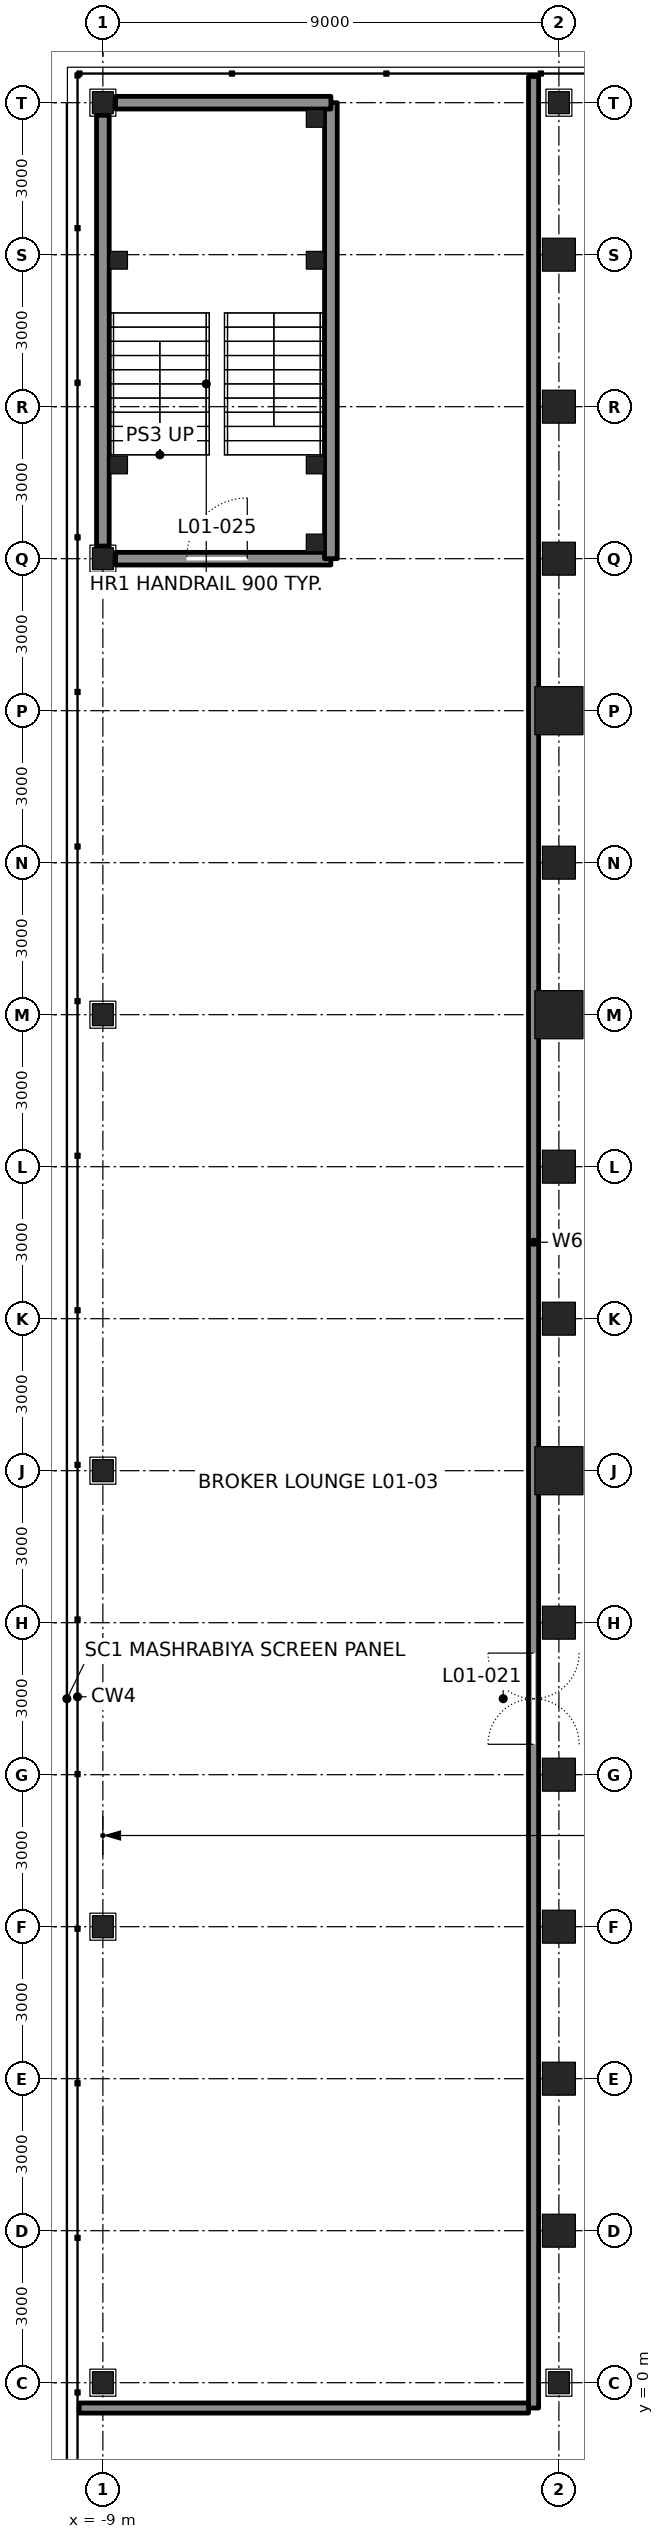
"""IFC4 building model, lengths in metres.
Left out: names, types, materials, properties, quantities, classifications, styles, units other than length and angle.
Written with IfcOpenShell. Run it as: python <this file> out.ifc"""

import sys

from ifc_helpers import new_model, si_unit, direction, frame, frame_2d, origin, origin_2d, place, context, subcontext, project, spatial, rectangle, hollow_rectangle, i_section, extrude, element, fill, save


model = new_model("IFC4")
c1 = context("Model", 3, precision=1e-05, world=origin(), true_north=direction((0.0, 1.0)))
c2 = subcontext(c1, "Body", "Model", "MODEL_VIEW")
j1 = project(units=[si_unit("LENGTHUNIT", "METRE"), si_unit("PLANEANGLEUNIT", "RADIAN")], contexts=[c1])
p1 = place(None, origin())
s1 = spatial("IfcSite", under=j1, at=p1, CompositionType="ELEMENT")
p2 = place(p1, origin())
s2 = spatial("IfcBuilding", under=s1, at=p2, CompositionType="ELEMENT")
p3 = place(p2, frame((0.0, 0.0, 6.0)))
s3 = spatial("IfcBuildingStorey", under=s2, at=p3, CompositionType="ELEMENT", Elevation=6.0)
for number, where, z_axis, x_axis in (
    (1, (0.0, 42.0, 0.0), (0.0, 0.0, 1.0), (-1.0, 0.0, 0.0)),
    (2, (0.0, 39.0, 0.0), (0.0, 0.0, 1.0), (-1.0, 0.0, 0.0)),
    (3, (0.0, 36.0, 0.0), (0.0, 0.0, 1.0), (-1.0, 0.0, 0.0)),
):
    element("IfcColumn", number, at=place(p3, frame(where, z_axis=z_axis, x_axis=x_axis)), inside=s3, PredefinedType="COLUMN", context=c2, shape_type="SweptSolid", body=[
        extrude(hollow_rectangle(XDim=0.65, YDim=0.65, WallThickness=0.065, at=origin_2d()), origin(), (0.0, 0.0, 1.0), 7.5),
    ])
p4 = place(p3, frame((0.0, 33.0, 0.0), z_axis=(0.0, 0.0, 1.0), x_axis=(-1.0, 0.0, 0.0)))
e4 = element("IfcColumn", 4, at=p4, inside=s3, PredefinedType="COLUMN", context=c2, shape_type="SweptSolid", body=[
    extrude(hollow_rectangle(XDim=0.95, YDim=0.95, WallThickness=0.11, at=origin_2d()), origin(), (0.0, 0.0, 1.0), 7.5),
])
p5 = place(p3, frame((0.0, 30.0, 0.0), z_axis=(0.0, 0.0, 1.0), x_axis=(-1.0, 0.0, 0.0)))
e5 = element("IfcColumn", 5, at=p5, inside=s3, PredefinedType="COLUMN", context=c2, shape_type="SweptSolid", body=[
    extrude(hollow_rectangle(XDim=0.65, YDim=0.65, WallThickness=0.065, at=origin_2d()), origin(), (0.0, 0.0, 1.0), 7.5),
])
p6 = place(p3, frame((0.0, 27.0, 0.0), z_axis=(0.0, 0.0, 1.0), x_axis=(-1.0, 0.0, 0.0)))
e6 = element("IfcColumn", 6, at=p6, inside=s3, PredefinedType="COLUMN", context=c2, shape_type="SweptSolid", body=[
    extrude(hollow_rectangle(XDim=0.95, YDim=0.95, WallThickness=0.11, at=origin_2d()), origin(), (0.0, 0.0, 1.0), 7.5),
])
for number, where, z_axis, x_axis in (
    (7, (0.0, 24.0, 0.0), (0.0, 0.0, 1.0), (-1.0, 0.0, 0.0)),
    (8, (0.0, 21.0, 0.0), (0.0, 0.0, 1.0), (-1.0, 0.0, 0.0)),
):
    element("IfcColumn", number, at=place(p3, frame(where, z_axis=z_axis, x_axis=x_axis)), inside=s3, PredefinedType="COLUMN", context=c2, shape_type="SweptSolid", body=[
        extrude(hollow_rectangle(XDim=0.65, YDim=0.65, WallThickness=0.065, at=origin_2d()), origin(), (0.0, 0.0, 1.0), 7.5),
    ])
p7 = place(p3, frame((0.0, 18.0, 0.0), z_axis=(0.0, 0.0, 1.0), x_axis=(-1.0, 0.0, 0.0)))
e9 = element("IfcColumn", 9, at=p7, inside=s3, PredefinedType="COLUMN", context=c2, shape_type="SweptSolid", body=[
    extrude(hollow_rectangle(XDim=0.95, YDim=0.95, WallThickness=0.11, at=origin_2d()), origin(), (0.0, 0.0, 1.0), 7.5),
])
for number, where, z_axis, x_axis in (
    (10, (0.0, 15.0, 0.0), (0.0, 0.0, 1.0), (-1.0, 0.0, 0.0)),
    (11, (0.0, 12.0, 0.0), (0.0, 0.0, 1.0), (-1.0, 0.0, 0.0)),
    (12, (0.0, 9.0, 0.0), (0.0, 0.0, 1.0), (-1.0, 0.0, 0.0)),
    (13, (0.0, 6.0, 0.0), (0.0, 0.0, 1.0), (-1.0, 0.0, 0.0)),
    (14, (0.0, 3.0, 0.0), (0.0, 0.0, 1.0), (-1.0, 0.0, 0.0)),
):
    element("IfcColumn", number, at=place(p3, frame(where, z_axis=z_axis, x_axis=x_axis)), inside=s3, PredefinedType="COLUMN", context=c2, shape_type="SweptSolid", body=[
        extrude(hollow_rectangle(XDim=0.65, YDim=0.65, WallThickness=0.065, at=origin_2d()), origin(), (0.0, 0.0, 1.0), 7.5),
    ])
for number, where, z_axis, x_axis in (
    (15, (-9.0, 0.0, 0.0), (0.0, 0.0, 1.0), (1.0, 0.0, 0.0)),
    (16, (-9.0, 9.0, 0.0), (0.0, 0.0, 1.0), (1.0, 0.0, 0.0)),
    (17, (-9.0, 18.0, 0.0), (0.0, 0.0, 1.0), (1.0, 0.0, 0.0)),
    (18, (-9.0, 27.0, 0.0), (0.0, 0.0, 1.0), (1.0, 0.0, 0.0)),
    (19, (-9.0, 36.0, 0.0), (0.0, 0.0, 1.0), (1.0, 0.0, 0.0)),
    (20, (-9.0, 45.0, 0.0), (0.0, 0.0, 1.0), (1.0, 0.0, 0.0)),
    (21, (0.0, 0.0, 0.0), (0.0, 0.0, 1.0), (1.0, 0.0, 0.0)),
    (22, (0.0, 45.0, 0.0), (0.0, 0.0, 1.0), (1.0, 0.0, 0.0)),
):
    element("IfcColumn", number, at=place(p3, frame(where, z_axis=z_axis, x_axis=x_axis)), inside=s3, PredefinedType="COLUMN", context=c2, shape_type="SweptSolid", body=[
        extrude(i_section(OverallWidth=0.411, OverallDepth=0.434, WebThickness=0.036, FlangeThickness=0.057, at=origin_2d()), origin(), (0.0, 0.0, 1.0), 7.5),
    ])
p8 = place(p3, frame((-0.5, -0.5, 0.0), z_axis=(0.0, 0.0, 1.0), x_axis=(0.0, 1.0, 0.0)))
e23 = element("IfcWall", 23, at=p8, inside=s3, PredefinedType="PARTITIONING", context=c2, shape_type="SweptSolid", body=[
    extrude(rectangle(XDim=46.018, YDim=0.2, at=frame_2d((23.009, 0.0))), origin(), (0.0, 0.0, 1.0), 7.3),
])
p9 = place(p8, frame((13.1, 0.0, 0.0)))
e24 = element("IfcOpeningElement", 24, at=p9, cuts=e23, PredefinedType="OPENING", context=c2, shape_type="SweptSolid", body=[
    extrude(rectangle(XDim=1.8, YDim=2.4, at=frame_2d((0.9, 1.2))), frame((0.0, 0.11, 0.0), z_axis=(0.0, -1.0, 0.0), x_axis=(1.0, 0.0, 0.0)), (0.0, 0.0, 1.0), 0.22),
])
p10 = place(p3, frame((-9.468, -0.5, 0.0), z_axis=(0.0, 0.0, 1.0), x_axis=(1.0, 0.0, 0.0)))
e25 = element("IfcWall", 25, at=p10, inside=s3, PredefinedType="PARTITIONING", context=c2, shape_type="SweptSolid", body=[
    extrude(rectangle(XDim=8.868, YDim=0.2, at=frame_2d((4.434, 0.0))), origin(), (0.0, 0.0, 1.0), 7.3),
])
p11 = place(p3, frame((-8.75, 36.0, 0.0), z_axis=(0.0, 0.0, 1.0), x_axis=(1.0, 0.0, 0.0)))
e26 = element("IfcWall", 26, at=p11, inside=s3, PredefinedType="SOLIDWALL", context=c2, shape_type="SweptSolid", body=[
    extrude(rectangle(XDim=4.25, YDim=0.25, at=frame_2d((2.125, 0.0))), origin(), (0.0, 0.0, 1.0), 6.353),
])
p12 = place(p11, frame((1.4, 0.0, 0.0)))
e27 = element("IfcOpeningElement", 27, at=p12, cuts=e26, PredefinedType="OPENING", context=c2, shape_type="SweptSolid", body=[
    extrude(rectangle(XDim=1.2, YDim=2.1, at=frame_2d((0.6, 1.05))), frame((0.0, 0.135, 0.0), z_axis=(0.0, -1.0, 0.0), x_axis=(1.0, 0.0, 0.0)), (0.0, 0.0, 1.0), 0.27),
])
p13 = place(p3, frame((-4.5, 36.0, 0.0), z_axis=(0.0, 0.0, 1.0), x_axis=(0.0, 1.0, 0.0)))
e28 = element("IfcWall", 28, at=p13, inside=s3, PredefinedType="SOLIDWALL", context=c2, shape_type="SweptSolid", body=[
    extrude(rectangle(XDim=9.0, YDim=0.25, at=frame_2d((4.5, 0.0))), origin(), (0.0, 0.0, 1.0), 6.353),
])
p14 = place(p3, frame((-8.75, 45.0, 0.0), z_axis=(0.0, 0.0, 1.0), x_axis=(1.0, 0.0, 0.0)))
e29 = element("IfcWall", 29, at=p14, inside=s3, PredefinedType="SOLIDWALL", context=c2, shape_type="SweptSolid", body=[
    extrude(rectangle(XDim=4.25, YDim=0.25, at=frame_2d((2.125, 0.0))), origin(), (0.0, 0.0, 1.0), 6.353),
])
p15 = place(p3, frame((-9.0, 36.25, 0.0), z_axis=(0.0, 0.0, 1.0), x_axis=(0.0, 1.0, 0.0)))
e30 = element("IfcWall", 30, at=p15, inside=s3, PredefinedType="SOLIDWALL", context=c2, shape_type="SweptSolid", body=[
    extrude(rectangle(XDim=8.5, YDim=0.25, at=frame_2d((4.25, 0.0))), origin(), (0.0, 0.0, 1.0), 6.353),
])
for number, where, z_axis, x_axis in (
    (31, (-4.81, 44.69, 0.0), (0.0, 0.0, 1.0), (1.0, 0.0, 0.0)),
    (32, (-8.69, 41.89, 0.0), (0.0, 0.0, 1.0), (1.0, 0.0, 0.0)),
    (33, (-4.81, 41.89, 0.0), (0.0, 0.0, 1.0), (1.0, 0.0, 0.0)),
    (34, (-8.69, 37.85, 0.0), (0.0, 0.0, 1.0), (1.0, 0.0, 0.0)),
    (35, (-4.81, 37.85, 0.0), (0.0, 0.0, 1.0), (1.0, 0.0, 0.0)),
    (36, (-4.81, 36.31, 0.0), (0.0, 0.0, 1.0), (1.0, 0.0, 0.0)),
):
    element("IfcColumn", number, at=place(p3, frame(where, z_axis=z_axis, x_axis=x_axis)), inside=s3, PredefinedType="COLUMN", context=c2, shape_type="SweptSolid", body=[
        extrude(hollow_rectangle(XDim=0.35, YDim=0.35, WallThickness=0.035, at=origin_2d()), origin(), (0.0, 0.0, 1.0), 7.5),
    ])
p16 = place(p9, origin())
e37 = element("IfcDoor", 37, at=p16, inside=s3, OperationType="DOUBLE_DOOR_DOUBLE_SWING", PredefinedType="DOOR", context=c2, shape_type="SweptSolid", body=[
    extrude(rectangle(XDim=1.8, YDim=2.4, at=frame_2d((0.9, 1.2))), frame((0.0, 0.025, 0.0), z_axis=(0.0, -1.0, 0.0), x_axis=(1.0, 0.0, 0.0)), (0.0, 0.0, 1.0), 0.05),
])
fill(e24, e37)
p17 = place(p12, origin())
e38 = element("IfcDoor", 38, at=p17, inside=s3, OperationType="SINGLE_SWING_RIGHT", PredefinedType="DOOR", context=c2, shape_type="SweptSolid", body=[
    extrude(rectangle(XDim=1.2, YDim=2.1, at=frame_2d((0.6, 1.05))), frame((0.0, 0.025, 0.0), z_axis=(0.0, -1.0, 0.0), x_axis=(1.0, 0.0, 0.0)), (0.0, 0.0, 1.0), 0.05),
])
fill(e27, e38)
save(model, sys.argv[1])
